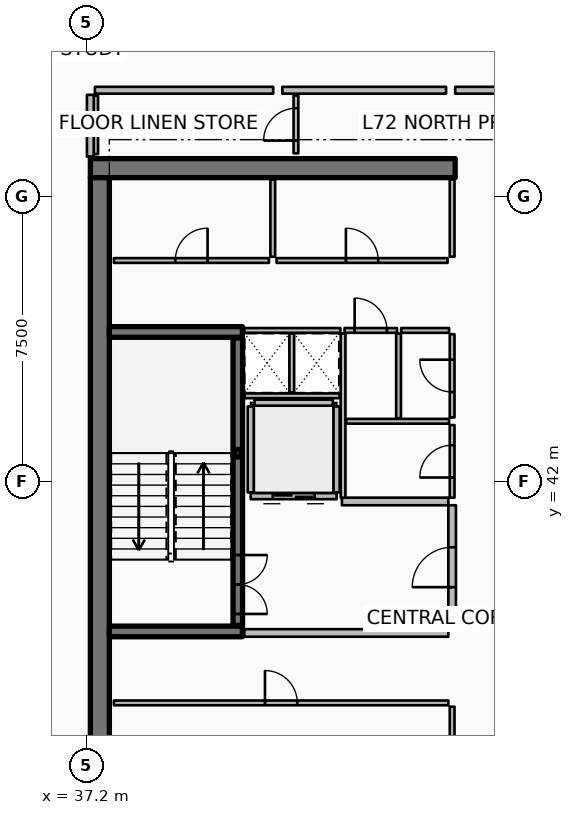
"""IFC4 building model, lengths in metres.
Left out: names, types, materials, properties, quantities, classifications, styles, units other than length and angle.
Written with IfcOpenShell. Run it as: python <this file> out.ifc"""

import sys

from ifc_helpers import new_model, si_unit, direction, frame, frame_2d, origin, origin_2d, place, context, subcontext, project, spatial, rectangle, hollow_rectangle, extrude, element, fill, save


model = new_model("IFC4")
c1 = context("Model", 3, precision=1e-05, world=origin(), true_north=direction((0.0, 1.0)))
c2 = subcontext(c1, "Body", "Model", "MODEL_VIEW")
j1 = project(units=[si_unit("LENGTHUNIT", "METRE"), si_unit("PLANEANGLEUNIT", "RADIAN")], contexts=[c1])
p1 = place(None, origin())
s1 = spatial("IfcSite", under=j1, at=p1, CompositionType="ELEMENT")
p2 = place(p1, origin())
s2 = spatial("IfcBuilding", under=s1, at=p2, CompositionType="ELEMENT")
p3 = place(p2, frame((0.0, 0.0, 286.75)))
s3 = spatial("IfcBuildingStorey", under=s2, at=p3, CompositionType="ELEMENT", Elevation=286.75)
p4 = place(p3, frame((37.3, 50.25, 0.0), z_axis=(0.0, 0.0, 1.0), x_axis=(1.0, 0.0, 0.0)))
e1 = element("IfcWall", 1, at=p4, inside=s3, PredefinedType="SHEAR", context=c2, shape_type="SweptSolid", body=[
    extrude(rectangle(XDim=9.6, YDim=0.5, at=frame_2d((4.8, 0.0))), origin(), (0.0, 0.0, 1.0), 3.85),
])
p5 = place(p3, frame((37.55, 34.0, 0.0), z_axis=(0.0, 0.0, 1.0), x_axis=(0.0, 1.0, 0.0)))
e2 = element("IfcWall", 2, at=p5, inside=s3, PredefinedType="SHEAR", context=c2, shape_type="SweptSolid", body=[
    extrude(rectangle(XDim=16.0, YDim=0.5, at=frame_2d((8.0, 0.0))), origin(), (0.0, 0.0, 1.0), 3.85),
])
for number, where, z_axis, x_axis in (
    (3, (37.8, 38.06, 0.0), (0.0, 0.0, 1.0), (1.0, 0.0, 0.0)),
    (4, (37.8, 45.94, 0.0), (0.0, 0.0, 1.0), (1.0, 0.0, 0.0)),
):
    element("IfcWall", number, at=place(p3, frame(where, z_axis=z_axis, x_axis=x_axis)), inside=s3, PredefinedType="SHEAR", context=c2, shape_type="SweptSolid", body=[
        extrude(rectangle(XDim=3.5, YDim=0.28, at=frame_2d((1.75, 0.0))), origin(), (0.0, 0.0, 1.0), 3.85),
    ])
p6 = place(p3, frame((41.18, 42.75, 0.0), z_axis=(0.0, 0.0, 1.0), x_axis=(1.0, 0.0, 0.0)))
e5 = element("IfcColumn", 5, at=p6, inside=s3, PredefinedType="COLUMN", context=c2, shape_type="SweptSolid", body=[
    extrude(hollow_rectangle(XDim=0.2, YDim=0.2, WallThickness=0.01, InnerFilletRadius=0.01, OuterFilletRadius=0.02, at=origin_2d()), origin(), (0.0, 0.0, 1.0), 1.72),
])
p7 = place(p3, frame((41.18, 38.22, 0.0), z_axis=(0.0, 0.0, 1.0), x_axis=(0.0, 1.0, 0.0)))
e6 = element("IfcWall", 6, at=p7, inside=s3, PredefinedType="SOLIDWALL", context=c2, shape_type="SweptSolid", body=[
    extrude(rectangle(XDim=7.56, YDim=0.25, at=frame_2d((3.78, 0.0))), origin(), (0.0, 0.0, 1.0), 3.59),
])
p8 = place(p7, frame((0.3, 0.0, 0.0)))
e7 = element("IfcOpeningElement", 7, at=p8, cuts=e6, PredefinedType="OPENING", context=c2, shape_type="SweptSolid", body=[
    extrude(rectangle(XDim=1.55, YDim=2.15, at=frame_2d((0.775, 1.075))), frame((0.0, 0.135, 0.0), z_axis=(0.0, -1.0, 0.0), x_axis=(1.0, 0.0, 0.0)), (0.0, 0.0, 1.0), 0.27),
])
p9 = place(p3, frame((43.78, 41.62, 0.0), z_axis=(0.0, 0.0, 1.0), x_axis=(-1.0, 0.0, 0.0)))
e8 = element("IfcWall", 8, at=p9, inside=s3, PredefinedType="PARTITIONING", context=c2, shape_type="SweptSolid", body=[
    extrude(rectangle(XDim=2.26, YDim=0.16, at=frame_2d((1.13, 0.0))), origin(), (0.0, 0.0, 1.0), 3.59),
])
p10 = place(p9, frame((0.58, 0.0, 0.0)))
e9 = element("IfcOpeningElement", 9, at=p10, cuts=e8, PredefinedType="OPENING", context=c2, shape_type="SweptSolid", body=[
    extrude(rectangle(XDim=1.1, YDim=2.1, at=frame_2d((0.55, 1.05))), frame((0.0, 0.09, 0.0), z_axis=(0.0, -1.0, 0.0), x_axis=(1.0, 0.0, 0.0)), (0.0, 0.0, 1.0), 0.18),
])
for number, where, z_axis, x_axis in (
    (10, (43.78, 41.72, 0.0), (0.0, 0.0, 1.0), (0.0, 1.0, 0.0)),
    (11, (41.52, 41.72, 0.0), (0.0, 0.0, 1.0), (0.0, 1.0, 0.0)),
):
    element("IfcWall", number, at=place(p3, frame(where, z_axis=z_axis, x_axis=x_axis)), inside=s3, PredefinedType="PARTITIONING", context=c2, shape_type="SweptSolid", body=[
        extrude(rectangle(XDim=2.26, YDim=0.16, at=frame_2d((1.13, 0.0))), origin(), (0.0, 0.0, 1.0), 3.59),
    ])
p11 = place(p3, frame((41.62, 44.08, 0.0), z_axis=(0.0, 0.0, 1.0), x_axis=(1.0, 0.0, 0.0)))
e12 = element("IfcWall", 12, at=p11, inside=s3, PredefinedType="PARTITIONING", context=c2, shape_type="SweptSolid", body=[
    extrude(rectangle(XDim=2.06, YDim=0.16, at=frame_2d((1.03, 0.0))), origin(), (0.0, 0.0, 1.0), 3.59),
])
p12 = place(p3, frame((46.82, 34.05, 0.0), z_axis=(0.0, 0.0, 1.0), x_axis=(0.0, 1.0, 0.0)))
e13 = element("IfcWall", 13, at=p12, inside=s3, PredefinedType="PARTITIONING", context=c2, shape_type="SweptSolid", body=[
    extrude(rectangle(XDim=2.03, YDim=0.125, at=frame_2d((1.015, 0.0))), origin(), (0.0, 0.0, 1.0), 3.03),
])
p13 = place(p3, frame((37.92, 36.18, 0.0), z_axis=(0.0, 0.0, 1.0), x_axis=(1.0, 0.0, 0.0)))
e14 = element("IfcWall", 14, at=p13, inside=s3, PredefinedType="PARTITIONING", context=c2, shape_type="SweptSolid", body=[
    extrude(rectangle(XDim=8.8, YDim=0.125, at=frame_2d((4.4, 0.0))), origin(), (0.0, 0.0, 1.0), 3.03),
])
p14 = place(p13, frame((3.975, 0.0, 0.0)))
e15 = element("IfcOpeningElement", 15, at=p14, cuts=e14, PredefinedType="OPENING", context=c2, shape_type="SweptSolid", body=[
    extrude(rectangle(XDim=0.85, YDim=2.06, at=frame_2d((0.425, 1.03))), frame((0.0, 0.073, 0.0), z_axis=(0.0, -1.0, 0.0), x_axis=(1.0, 0.0, 0.0)), (0.0, 0.0, 1.0), 0.145),
])
for number, where, z_axis, x_axis in (
    (16, (46.82, 47.92, 0.0), (0.0, 0.0, 1.0), (0.0, 1.0, 0.0)),
    (17, (42.1, 47.92, 0.0), (0.0, 0.0, 1.0), (0.0, 1.0, 0.0)),
):
    element("IfcWall", number, at=place(p3, frame(where, z_axis=z_axis, x_axis=x_axis)), inside=s3, PredefinedType="PARTITIONING", context=c2, shape_type="SweptSolid", body=[
        extrude(rectangle(XDim=2.03, YDim=0.125, at=frame_2d((1.015, 0.0))), origin(), (0.0, 0.0, 1.0), 3.03),
    ])
p15 = place(p3, frame((37.92, 47.82, 0.0), z_axis=(0.0, 0.0, 1.0), x_axis=(1.0, 0.0, 0.0)))
e18 = element("IfcWall", 18, at=p15, inside=s3, PredefinedType="PARTITIONING", context=c2, shape_type="SweptSolid", body=[
    extrude(rectangle(XDim=4.08, YDim=0.125, at=frame_2d((2.04, 0.0))), origin(), (0.0, 0.0, 1.0), 3.03),
])
p16 = place(p15, frame((1.615, 0.0, 0.0)))
e19 = element("IfcOpeningElement", 19, at=p16, cuts=e18, PredefinedType="OPENING", context=c2, shape_type="SweptSolid", body=[
    extrude(rectangle(XDim=0.85, YDim=2.06, at=frame_2d((0.425, 1.03))), frame((0.0, 0.073, 0.0), z_axis=(0.0, -1.0, 0.0), x_axis=(1.0, 0.0, 0.0)), (0.0, 0.0, 1.0), 0.145),
])
p17 = place(p3, frame((42.2, 47.82, 0.0), z_axis=(0.0, 0.0, 1.0), x_axis=(1.0, 0.0, 0.0)))
e20 = element("IfcWall", 20, at=p17, inside=s3, PredefinedType="PARTITIONING", context=c2, shape_type="SweptSolid", body=[
    extrude(rectangle(XDim=4.5, YDim=0.125, at=frame_2d((2.25, 0.0))), origin(), (0.0, 0.0, 1.0), 3.03),
])
p18 = place(p17, frame((1.825, 0.0, 0.0)))
e21 = element("IfcOpeningElement", 21, at=p18, cuts=e20, PredefinedType="OPENING", context=c2, shape_type="SweptSolid", body=[
    extrude(rectangle(XDim=0.85, YDim=2.06, at=frame_2d((0.425, 1.03))), frame((0.0, 0.073, 0.0), z_axis=(0.0, -1.0, 0.0), x_axis=(1.0, 0.0, 0.0)), (0.0, 0.0, 1.0), 0.145),
])
p19 = place(p3, frame((41.35, 38.02, 0.0), z_axis=(0.0, 0.0, 1.0), x_axis=(1.0, 0.0, 0.0)))
e22 = element("IfcWall", 22, at=p19, inside=s3, PredefinedType="PARTITIONING", context=c2, shape_type="SweptSolid", body=[
    extrude(rectangle(XDim=5.37, YDim=0.2, at=frame_2d((2.685, 0.0))), origin(), (0.0, 0.0, 1.0), 3.59),
])
p20 = place(p3, frame((43.92, 41.48, 0.0), z_axis=(0.0, 0.0, 1.0), x_axis=(1.0, 0.0, 0.0)))
e23 = element("IfcWall", 23, at=p20, inside=s3, PredefinedType="PARTITIONING", context=c2, shape_type="SweptSolid", body=[
    extrude(rectangle(XDim=2.8, YDim=0.2, at=frame_2d((1.4, 0.0))), origin(), (0.0, 0.0, 1.0), 3.59),
])
p21 = place(p3, frame((46.82, 38.12, 0.0), z_axis=(0.0, 0.0, 1.0), x_axis=(0.0, 1.0, 0.0)))
e24 = element("IfcWall", 24, at=p21, inside=s3, PredefinedType="PARTITIONING", context=c2, shape_type="SweptSolid", body=[
    extrude(rectangle(XDim=3.26, YDim=0.2, at=frame_2d((1.63, 0.0))), origin(), (0.0, 0.0, 1.0), 3.59),
])
p22 = place(p21, frame((1.105, 0.0, 0.0)))
e25 = element("IfcOpeningElement", 25, at=p22, cuts=e24, PredefinedType="OPENING", context=c2, shape_type="SweptSolid", body=[
    extrude(rectangle(XDim=1.05, YDim=2.1, at=frame_2d((0.525, 1.05))), frame((0.0, 0.11, 0.0), z_axis=(0.0, -1.0, 0.0), x_axis=(1.0, 0.0, 0.0)), (0.0, 0.0, 1.0), 0.22),
])
p23 = place(p3, frame((41.36, 44.26, 0.0), z_axis=(0.0, 0.0, 1.0), x_axis=(1.0, 0.0, 0.0)))
e26 = element("IfcWall", 26, at=p23, inside=s3, PredefinedType="PARTITIONING", context=c2, shape_type="SweptSolid", body=[
    extrude(rectangle(XDim=2.5, YDim=0.125, at=frame_2d((1.25, 0.0))), origin(), (0.0, 0.0, 1.0), 3.03),
])
p24 = place(p3, frame((42.6, 44.35, 0.0), z_axis=(0.0, 0.0, 1.0), x_axis=(0.0, 1.0, 0.0)))
e27 = element("IfcWall", 27, at=p24, inside=s3, PredefinedType="PARTITIONING", context=c2, shape_type="SweptSolid", body=[
    extrude(rectangle(XDim=1.55, YDim=0.125, at=frame_2d((0.775, 0.0))), origin(), (0.0, 0.0, 1.0), 3.03),
])
p25 = place(p3, frame((43.95, 41.58, 0.0), z_axis=(0.0, 0.0, 1.0), x_axis=(0.0, 1.0, 0.0)))
e28 = element("IfcWall", 28, at=p25, inside=s3, PredefinedType="PARTITIONING", context=c2, shape_type="SweptSolid", body=[
    extrude(rectangle(XDim=4.32, YDim=0.125, at=frame_2d((2.16, 0.0))), origin(), (0.0, 0.0, 1.0), 3.03),
])
p26 = place(p3, frame((44.03, 43.59, 0.0), z_axis=(0.0, 0.0, 1.0), x_axis=(1.0, 0.0, 0.0)))
e29 = element("IfcWall", 29, at=p26, inside=s3, PredefinedType="PARTITIONING", context=c2, shape_type="SweptSolid", body=[
    extrude(rectangle(XDim=2.71, YDim=0.125, at=frame_2d((1.355, 0.0))), origin(), (0.0, 0.0, 1.0), 3.03),
])
p27 = place(p3, frame((45.41, 43.67, 0.0), z_axis=(0.0, 0.0, 1.0), x_axis=(0.0, 1.0, 0.0)))
e30 = element("IfcWall", 30, at=p27, inside=s3, PredefinedType="PARTITIONING", context=c2, shape_type="SweptSolid", body=[
    extrude(rectangle(XDim=2.23, YDim=0.125, at=frame_2d((1.115, 0.0))), origin(), (0.0, 0.0, 1.0), 3.03),
])
p28 = place(p3, frame((46.82, 41.58, 0.0), z_axis=(0.0, 0.0, 1.0), x_axis=(0.0, 1.0, 0.0)))
e31 = element("IfcWall", 31, at=p28, inside=s3, PredefinedType="PARTITIONING", context=c2, shape_type="SweptSolid", body=[
    extrude(rectangle(XDim=1.91, YDim=0.125, at=frame_2d((0.955, 0.0))), origin(), (0.0, 0.0, 1.0), 3.03),
])
p29 = place(p28, frame((0.53, 0.0, 0.0)))
e32 = element("IfcOpeningElement", 32, at=p29, cuts=e31, PredefinedType="OPENING", context=c2, shape_type="SweptSolid", body=[
    extrude(rectangle(XDim=0.85, YDim=2.06, at=frame_2d((0.425, 1.03))), frame((0.0, 0.073, 0.0), z_axis=(0.0, -1.0, 0.0), x_axis=(1.0, 0.0, 0.0)), (0.0, 0.0, 1.0), 0.145),
])
p30 = place(p3, frame((46.82, 43.69, 0.0), z_axis=(0.0, 0.0, 1.0), x_axis=(0.0, 1.0, 0.0)))
e33 = element("IfcWall", 33, at=p30, inside=s3, PredefinedType="PARTITIONING", context=c2, shape_type="SweptSolid", body=[
    extrude(rectangle(XDim=2.19, YDim=0.125, at=frame_2d((1.095, 0.0))), origin(), (0.0, 0.0, 1.0), 3.03),
])
p31 = place(p30, frame((0.67, 0.0, 0.0)))
e34 = element("IfcOpeningElement", 34, at=p31, cuts=e33, PredefinedType="OPENING", context=c2, shape_type="SweptSolid", body=[
    extrude(rectangle(XDim=0.85, YDim=2.06, at=frame_2d((0.425, 1.03))), frame((0.0, 0.073, 0.0), z_axis=(0.0, -1.0, 0.0), x_axis=(1.0, 0.0, 0.0)), (0.0, 0.0, 1.0), 0.145),
])
p32 = place(p3, frame((41.35, 45.98, 0.0), z_axis=(0.0, 0.0, 1.0), x_axis=(1.0, 0.0, 0.0)))
e35 = element("IfcWall", 35, at=p32, inside=s3, PredefinedType="PARTITIONING", context=c2, shape_type="SweptSolid", body=[
    extrude(rectangle(XDim=2.53, YDim=0.125, at=frame_2d((1.265, 0.0))), origin(), (0.0, 0.0, 1.0), 3.03),
])
p33 = place(p3, frame((43.99, 45.98, 0.0), z_axis=(0.0, 0.0, 1.0), x_axis=(1.0, 0.0, 0.0)))
e36 = element("IfcWall", 36, at=p33, inside=s3, PredefinedType="PARTITIONING", context=c2, shape_type="SweptSolid", body=[
    extrude(rectangle(XDim=1.38, YDim=0.125, at=frame_2d((0.69, 0.0))), origin(), (0.0, 0.0, 1.0), 3.03),
])
p34 = place(p33, frame((0.265, 0.0, 0.0)))
e37 = element("IfcOpeningElement", 37, at=p34, cuts=e36, PredefinedType="OPENING", context=c2, shape_type="SweptSolid", body=[
    extrude(rectangle(XDim=0.85, YDim=2.06, at=frame_2d((0.425, 1.03))), frame((0.0, 0.073, 0.0), z_axis=(0.0, -1.0, 0.0), x_axis=(1.0, 0.0, 0.0)), (0.0, 0.0, 1.0), 0.145),
])
p35 = place(p3, frame((45.48, 45.98, 0.0), z_axis=(0.0, 0.0, 1.0), x_axis=(1.0, 0.0, 0.0)))
e38 = element("IfcWall", 38, at=p35, inside=s3, PredefinedType="PARTITIONING", context=c2, shape_type="SweptSolid", body=[
    extrude(rectangle(XDim=1.26, YDim=0.125, at=frame_2d((0.63, 0.0))), origin(), (0.0, 0.0, 1.0), 3.03),
])
p36 = place(p3, frame((37.44, 50.62, 0.0), z_axis=(0.0, 0.0, 1.0), x_axis=(0.0, 1.0, 0.0)))
e39 = element("IfcWall", 39, at=p36, inside=s3, PredefinedType="PARTITIONING", context=c2, shape_type="SweptSolid", body=[
    extrude(rectangle(XDim=1.54, YDim=0.125, at=frame_2d((0.77, 0.0))), origin(), (0.0, 0.0, 1.0), 3.03),
])
p37 = place(p3, frame((42.71, 50.64, 0.0), z_axis=(0.0, 0.0, 1.0), x_axis=(0.0, 1.0, 0.0)))
e40 = element("IfcWall", 40, at=p37, inside=s3, PredefinedType="PARTITIONING", context=c2, shape_type="SweptSolid", body=[
    extrude(rectangle(XDim=1.52, YDim=0.125, at=frame_2d((0.76, 0.0))), origin(), (0.0, 0.0, 1.0), 2.957),
])
p38 = place(p37, frame((0.335, 0.0, 0.0)))
e41 = element("IfcOpeningElement", 41, at=p38, cuts=e40, PredefinedType="OPENING", context=c2, shape_type="SweptSolid", body=[
    extrude(rectangle(XDim=0.85, YDim=2.06, at=frame_2d((0.425, 1.03))), frame((0.0, 0.073, 0.0), z_axis=(0.0, -1.0, 0.0), x_axis=(1.0, 0.0, 0.0)), (0.0, 0.0, 1.0), 0.145),
])
p39 = place(p3, frame((50.785, 52.3, 0.0), z_axis=(0.0, 0.0, 1.0), x_axis=(-1.0, 0.0, 0.0)))
e42 = element("IfcWall", 42, at=p39, inside=s3, PredefinedType="PARTITIONING", context=c2, shape_type="SweptSolid", body=[
    extrude(rectangle(XDim=3.884, YDim=0.18, at=frame_2d((1.942, 0.0))), origin(), (0.0, 0.0, 1.0), 2.957),
])
p40 = place(p3, frame((46.661, 52.3, 0.0), z_axis=(0.0, 0.0, 1.0), x_axis=(-1.0, 0.0, 0.0)))
e43 = element("IfcWall", 43, at=p40, inside=s3, PredefinedType="PARTITIONING", context=c2, shape_type="SweptSolid", body=[
    extrude(rectangle(XDim=4.309, YDim=0.18, at=frame_2d((2.155, 0.0))), origin(), (0.0, 0.0, 1.0), 2.957),
])
p41 = place(p3, frame((42.112, 52.3, 0.0), z_axis=(0.0, 0.0, 1.0), x_axis=(-1.0, 0.0, 0.0)))
e44 = element("IfcWall", 44, at=p41, inside=s3, PredefinedType="PARTITIONING", context=c2, shape_type="SweptSolid", body=[
    extrude(rectangle(XDim=4.692, YDim=0.18, at=frame_2d((2.346, 0.0))), origin(), (0.0, 0.0, 1.0), 2.957),
])
p42 = place(p3, frame((37.3, 52.18, 0.0), z_axis=(0.0, 0.0, 1.0), x_axis=(0.0, -1.0, 0.0)))
e45 = element("IfcWall", 45, at=p42, inside=s3, PredefinedType="PARTITIONING", context=c2, shape_type="SweptSolid", body=[
    extrude(rectangle(XDim=1.625, YDim=0.18, at=frame_2d((0.812, 0.0))), origin(), (0.0, 0.0, 1.0), 2.957),
])
p43 = place(p3, frame((39.536, 56.894, 0.0), z_axis=(0.0, 0.0, 1.0), x_axis=(-0.760410931944, -0.649442233443, 0.0)))
e46 = element("IfcWall", 46, at=p43, inside=s3, PredefinedType="PARTITIONING", context=c2, shape_type="SweptSolid", body=[
    extrude(rectangle(XDim=6.473, YDim=0.125, at=frame_2d((3.236, 0.0))), origin(), (0.0, 0.0, 1.0), 2.957),
])
p44 = place(p43, frame((2.786, 0.0, 0.0)))
e47 = element("IfcOpeningElement", 47, at=p44, cuts=e46, PredefinedType="OPENING", context=c2, shape_type="SweptSolid", body=[
    extrude(rectangle(XDim=0.9, YDim=2.08, at=frame_2d((0.45, 1.04))), frame((0.0, 0.073, 0.0), z_axis=(0.0, -1.0, 0.0), x_axis=(1.0, 0.0, 0.0)), (0.0, 0.0, 1.0), 0.145),
])
p45 = place(p8, origin())
e48 = element("IfcDoor", 48, at=p45, inside=s3, OperationType="DOUBLE_DOOR_SINGLE_SWING", PredefinedType="DOOR", context=c2, shape_type="SweptSolid", body=[
    extrude(rectangle(XDim=1.55, YDim=2.15, at=frame_2d((0.775, 1.075))), frame((0.0, 0.025, 0.0), z_axis=(0.0, -1.0, 0.0), x_axis=(1.0, 0.0, 0.0)), (0.0, 0.0, 1.0), 0.05),
])
fill(e7, e48)
p46 = place(p10, origin())
e49 = element("IfcDoor", 49, at=p46, inside=s3, OperationType="DOUBLE_DOOR_SLIDING", PredefinedType="DOOR", context=c2, shape_type="SweptSolid", body=[
    extrude(rectangle(XDim=1.1, YDim=2.1, at=frame_2d((0.55, 1.05))), frame((0.0, 0.025, 0.0), z_axis=(0.0, -1.0, 0.0), x_axis=(1.0, 0.0, 0.0)), (0.0, 0.0, 1.0), 0.05),
])
fill(e9, e49)
p47 = place(p14, origin())
e50 = element("IfcDoor", 50, at=p47, inside=s3, OperationType="SINGLE_SWING_LEFT", PredefinedType="DOOR", context=c2, shape_type="SweptSolid", body=[
    extrude(rectangle(XDim=0.85, YDim=2.06, at=frame_2d((0.425, 1.03))), frame((0.0, 0.025, 0.0), z_axis=(0.0, -1.0, 0.0), x_axis=(1.0, 0.0, 0.0)), (0.0, 0.0, 1.0), 0.05),
])
fill(e15, e50)
p48 = place(p16, origin())
e51 = element("IfcDoor", 51, at=p48, inside=s3, OperationType="SINGLE_SWING_RIGHT", PredefinedType="DOOR", context=c2, shape_type="SweptSolid", body=[
    extrude(rectangle(XDim=0.85, YDim=2.06, at=frame_2d((0.425, 1.03))), frame((0.0, 0.025, 0.0), z_axis=(0.0, -1.0, 0.0), x_axis=(1.0, 0.0, 0.0)), (0.0, 0.0, 1.0), 0.05),
])
fill(e19, e51)
p49 = place(p18, origin())
e52 = element("IfcDoor", 52, at=p49, inside=s3, OperationType="SINGLE_SWING_LEFT", PredefinedType="DOOR", context=c2, shape_type="SweptSolid", body=[
    extrude(rectangle(XDim=0.85, YDim=2.06, at=frame_2d((0.425, 1.03))), frame((0.0, 0.025, 0.0), z_axis=(0.0, -1.0, 0.0), x_axis=(1.0, 0.0, 0.0)), (0.0, 0.0, 1.0), 0.05),
])
fill(e21, e52)
p50 = place(p22, origin())
e53 = element("IfcDoor", 53, at=p50, inside=s3, OperationType="SINGLE_SWING_LEFT", PredefinedType="DOOR", context=c2, shape_type="SweptSolid", body=[
    extrude(rectangle(XDim=1.05, YDim=2.1, at=frame_2d((0.525, 1.05))), frame((0.0, 0.025, 0.0), z_axis=(0.0, -1.0, 0.0), x_axis=(1.0, 0.0, 0.0)), (0.0, 0.0, 1.0), 0.05),
])
fill(e25, e53)
p51 = place(p29, origin())
e54 = element("IfcDoor", 54, at=p51, inside=s3, OperationType="SINGLE_SWING_LEFT", PredefinedType="DOOR", context=c2, shape_type="SweptSolid", body=[
    extrude(rectangle(XDim=0.85, YDim=2.06, at=frame_2d((0.425, 1.03))), frame((0.0, 0.025, 0.0), z_axis=(0.0, -1.0, 0.0), x_axis=(1.0, 0.0, 0.0)), (0.0, 0.0, 1.0), 0.05),
])
fill(e32, e54)
p52 = place(p31, origin())
e55 = element("IfcDoor", 55, at=p52, inside=s3, OperationType="SINGLE_SWING_RIGHT", PredefinedType="DOOR", context=c2, shape_type="SweptSolid", body=[
    extrude(rectangle(XDim=0.85, YDim=2.06, at=frame_2d((0.425, 1.03))), frame((0.0, 0.025, 0.0), z_axis=(0.0, -1.0, 0.0), x_axis=(1.0, 0.0, 0.0)), (0.0, 0.0, 1.0), 0.05),
])
fill(e34, e55)
p53 = place(p34, origin())
e56 = element("IfcDoor", 56, at=p53, inside=s3, OperationType="SINGLE_SWING_LEFT", PredefinedType="DOOR", context=c2, shape_type="SweptSolid", body=[
    extrude(rectangle(XDim=0.85, YDim=2.06, at=frame_2d((0.425, 1.03))), frame((0.0, 0.025, 0.0), z_axis=(0.0, -1.0, 0.0), x_axis=(1.0, 0.0, 0.0)), (0.0, 0.0, 1.0), 0.05),
])
fill(e37, e56)
p54 = place(p38, origin())
e57 = element("IfcDoor", 57, at=p54, inside=s3, OperationType="SINGLE_SWING_LEFT", PredefinedType="DOOR", context=c2, shape_type="SweptSolid", body=[
    extrude(rectangle(XDim=0.85, YDim=2.06, at=frame_2d((0.425, 1.03))), frame((0.0, 0.025, 0.0), z_axis=(0.0, -1.0, 0.0), x_axis=(1.0, 0.0, 0.0)), (0.0, 0.0, 1.0), 0.05),
])
fill(e41, e57)
save(model, sys.argv[1])
